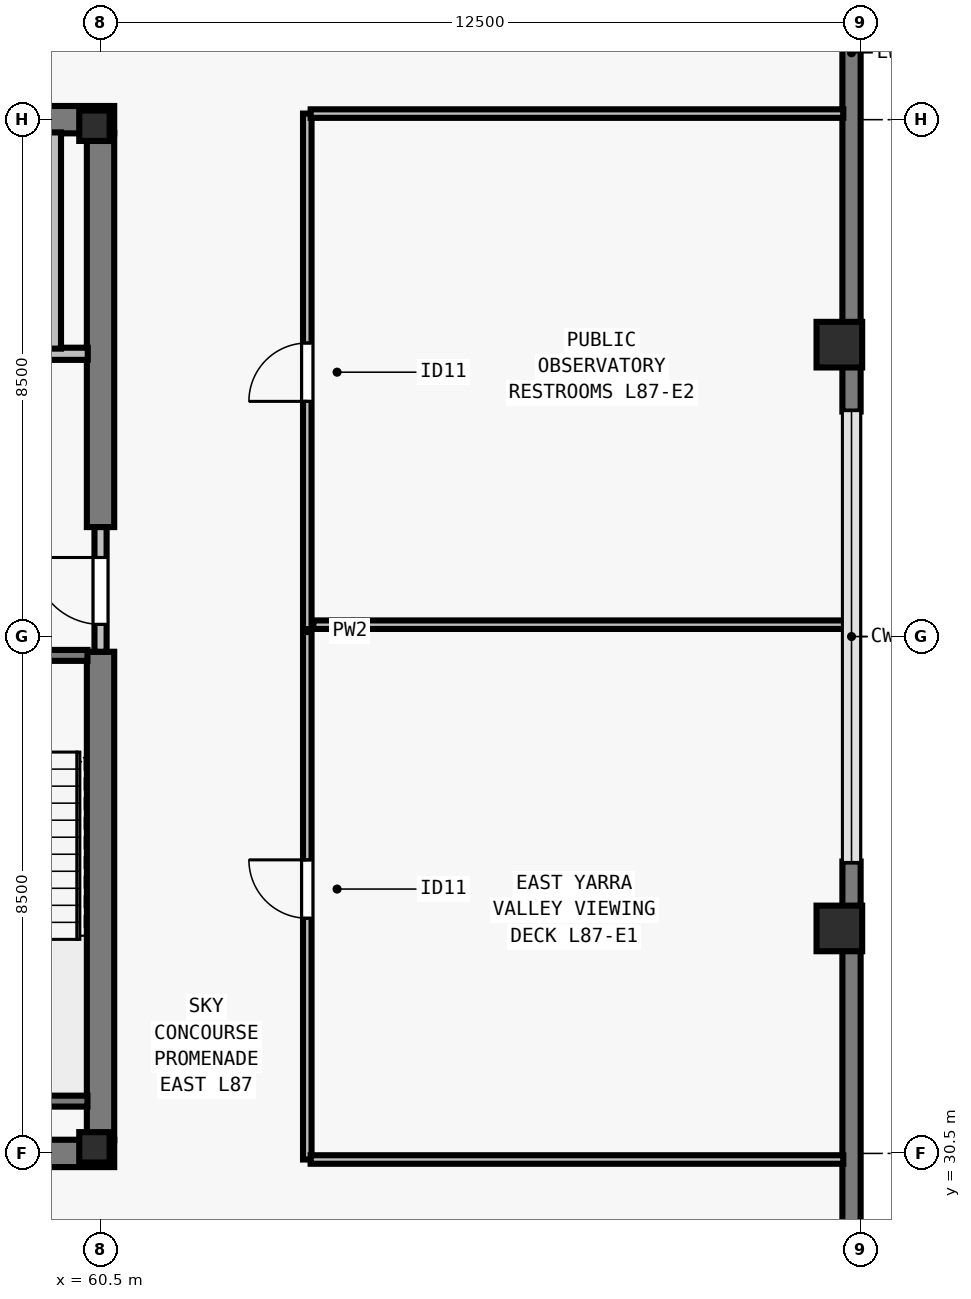
"""IFC4 building model, lengths in metres.
Left out: names, types, materials, properties, quantities, classifications, styles, units other than length and angle.
Written with IfcOpenShell. Run it as: python <this file> out.ifc"""

import sys

from ifc_helpers import new_model, si_unit, direction, frame, frame_2d, origin, origin_2d, place, context, subcontext, project, spatial, rectangle, i_section, extrude, element, fill, save


model = new_model("IFC4")
c1 = context("Model", 3, precision=1e-05, world=origin(), true_north=direction((0.0, 1.0)))
c2 = subcontext(c1, "Body", "Model", "MODEL_VIEW")
j1 = project(units=[si_unit("LENGTHUNIT", "METRE"), si_unit("PLANEANGLEUNIT", "RADIAN")], contexts=[c1])
p1 = place(None, origin())
s1 = spatial("IfcSite", under=j1, at=p1, CompositionType="ELEMENT")
p2 = place(p1, origin())
s2 = spatial("IfcBuilding", under=s1, at=p2, CompositionType="ELEMENT")
p3 = place(p2, frame((0.0, 0.0, 315.5)))
s3 = spatial("IfcBuildingStorey", under=s2, at=p3, CompositionType="ELEMENT", Elevation=315.5)
for number, where, z_axis, x_axis in (
    (1, (60.4, 30.6, 0.0), (0.0, 0.0, 1.0), (1.0, 0.0, 0.0)),
    (2, (60.4, 47.4, 0.0), (0.0, 0.0, 1.0), (1.0, 0.0, 0.0)),
):
    element("IfcColumn", number, at=place(p3, frame(where, z_axis=z_axis, x_axis=x_axis)), inside=s3, PredefinedType="COLUMN", context=c2, shape_type="SweptSolid", body=[
        extrude(i_section(OverallWidth=0.5, OverallDepth=0.5, WebThickness=0.028, FlangeThickness=0.045, at=origin_2d()), origin(), (0.0, 0.0, 1.0), 4.5),
    ])
for number, where, z_axis, x_axis in (
    (3, (72.65, 34.2, 0.0), (0.0, 0.0, 1.0), (0.0, 1.0, 0.0)),
    (4, (72.65, 43.8, 0.0), (0.0, 0.0, 1.0), (0.0, 1.0, 0.0)),
):
    element("IfcColumn", number, at=place(p3, frame(where, z_axis=z_axis, x_axis=x_axis)), inside=s3, PredefinedType="COLUMN", context=c2, shape_type="SweptSolid", body=[
        extrude(rectangle(XDim=0.75, YDim=0.75, at=origin_2d()), origin(), (0.0, 0.0, 1.0), 4.5),
    ])
p4 = place(p3, frame((72.85, 54.5, 0.0), z_axis=(0.0, 0.0, 1.0), x_axis=(0.0, -1.0, 0.0)))
e5 = element("IfcWall", 5, at=p4, inside=s3, PredefinedType="SOLIDWALL", context=c2, shape_type="SweptSolid", body=[
    extrude(rectangle(XDim=11.8, YDim=0.3, at=frame_2d((5.9, 0.0))), origin(), (0.0, 0.0, 1.0), 4.29),
])
p5 = place(p3, frame((72.85, 35.3, 0.0), z_axis=(0.0, 0.0, 1.0), x_axis=(0.0, -1.0, 0.0)))
e6 = element("IfcWall", 6, at=p5, inside=s3, PredefinedType="SOLIDWALL", context=c2, shape_type="SweptSolid", body=[
    extrude(rectangle(XDim=11.522, YDim=0.3, at=frame_2d((5.761, 0.0))), origin(), (0.0, 0.0, 1.0), 4.29),
])
for number, where, z_axis, x_axis in (
    (7, (43.275, 30.5, 0.0), (0.0, 0.0, 1.0), (1.0, 0.0, 0.0)),
    (8, (43.275, 47.5, 0.0), (0.0, 0.0, 1.0), (1.0, 0.0, 0.0)),
):
    element("IfcWall", number, at=place(p3, frame(where, z_axis=z_axis, x_axis=x_axis)), inside=s3, PredefinedType="SHEAR", context=c2, shape_type="SweptSolid", body=[
        extrude(rectangle(XDim=17.45, YDim=0.45, at=frame_2d((8.725, 0.0))), origin(), (0.0, 0.0, 1.0), 4.29),
    ])
p6 = place(p3, frame((60.5, 30.715, 0.0), z_axis=(0.0, 0.0, 1.0), x_axis=(0.0, 1.0, 0.0)))
e9 = element("IfcWall", 9, at=p6, inside=s3, PredefinedType="SHEAR", context=c2, shape_type="SweptSolid", body=[
    extrude(rectangle(XDim=8.035, YDim=0.45, at=frame_2d((4.018, 0.0))), origin(), (0.0, 0.0, 1.0), 4.29),
])
p7 = place(p3, frame((60.5, 40.8, 0.0), z_axis=(0.0, 0.0, 1.0), x_axis=(0.0, 1.0, 0.0)))
e10 = element("IfcWall", 10, at=p7, inside=s3, PredefinedType="SHEAR", context=c2, shape_type="SweptSolid", body=[
    extrude(rectangle(XDim=6.485, YDim=0.45, at=frame_2d((3.242, 0.0))), origin(), (0.0, 0.0, 1.0), 4.29),
])
p8 = place(p3, frame((60.5, 38.75, 0.0), z_axis=(0.0, 0.0, 1.0), x_axis=(0.0, 1.0, 0.0)))
e11 = element("IfcWall", 11, at=p8, inside=s3, PredefinedType="SOLIDWALL", context=c2, shape_type="SweptSolid", body=[
    extrude(rectangle(XDim=2.05, YDim=0.2, at=frame_2d((1.025, 0.0))), origin(), (0.0, 0.0, 1.0), 4.29),
])
p9 = place(p8, frame((0.45, 0.0, 0.0)))
e12 = element("IfcOpeningElement", 12, at=p9, cuts=e11, PredefinedType="OPENING", context=c2, shape_type="SweptSolid", body=[
    extrude(rectangle(XDim=1.1, YDim=2.15, at=frame_2d((0.55, 1.075))), frame((0.0, 0.11, 0.0), z_axis=(0.0, -1.0, 0.0), x_axis=(1.0, 0.0, 0.0)), (0.0, 0.0, 1.0), 0.22),
])
p10 = place(p3, frame((56.735, 43.65, 0.0), z_axis=(0.0, 0.0, 1.0), x_axis=(1.0, 0.0, 0.0)))
e13 = element("IfcWall", 13, at=p10, inside=s3, PredefinedType="SOLIDWALL", context=c2, shape_type="SweptSolid", body=[
    extrude(rectangle(XDim=3.555, YDim=0.2, at=frame_2d((1.777, 0.0))), origin(), (0.0, 0.0, 1.0), 4.29),
])
p11 = place(p10, frame((1.295, 0.0, 0.0)))
e14 = element("IfcOpeningElement", 14, at=p11, cuts=e13, PredefinedType="OPENING", context=c2, shape_type="SweptSolid", body=[
    extrude(rectangle(XDim=1.1, YDim=2.2, at=frame_2d((0.55, 1.1))), frame((0.0, 0.11, 0.0), z_axis=(0.0, -1.0, 0.0), x_axis=(1.0, 0.0, 0.0)), (0.0, 0.0, 1.0), 0.22),
])
p12 = place(p3, frame((59.75, 43.735, 0.0), z_axis=(0.0, 0.0, 1.0), x_axis=(0.0, 1.0, 0.0)))
e15 = element("IfcWall", 15, at=p12, inside=s3, PredefinedType="SOLIDWALL", context=c2, shape_type="SweptSolid", body=[
    extrude(rectangle(XDim=3.555, YDim=0.2, at=frame_2d((1.777, 0.0))), origin(), (0.0, 0.0, 1.0), 4.29),
])
p13 = place(p3, frame((63.9, 30.4, 0.0), z_axis=(0.0, 0.0, 1.0), x_axis=(0.0, 1.0, 0.0)))
e16 = element("IfcWall", 16, at=p13, inside=s3, PredefinedType="PARTITIONING", context=c2, shape_type="SweptSolid", body=[
    extrude(rectangle(XDim=17.2, YDim=0.14, at=frame_2d((8.6, 0.0))), origin(), (0.0, 0.0, 1.0), 4.29),
])
p14 = place(p13, frame((3.968, 0.0, 0.0)))
e17 = element("IfcOpeningElement", 17, at=p14, cuts=e16, PredefinedType="OPENING", context=c2, shape_type="SweptSolid", body=[
    extrude(rectangle(XDim=0.96, YDim=2.12, at=frame_2d((0.48, 1.06))), frame((0.0, 0.08, 0.0), z_axis=(0.0, -1.0, 0.0), x_axis=(1.0, 0.0, 0.0)), (0.0, 0.0, 1.0), 0.16),
])
p15 = place(p13, frame((12.468, 0.0, 0.0)))
e18 = element("IfcOpeningElement", 18, at=p15, cuts=e16, PredefinedType="OPENING", context=c2, shape_type="SweptSolid", body=[
    extrude(rectangle(XDim=0.96, YDim=2.12, at=frame_2d((0.48, 1.06))), frame((0.0, 0.08, 0.0), z_axis=(0.0, -1.0, 0.0), x_axis=(1.0, 0.0, 0.0)), (0.0, 0.0, 1.0), 0.16),
])
for number, where, z_axis, x_axis in (
    (19, (63.955, 30.4, 0.0), (0.0, 0.0, 1.0), (1.0, 0.0, 0.0)),
    (20, (63.955, 47.6, 0.0), (0.0, 0.0, 1.0), (1.0, 0.0, 0.0)),
):
    element("IfcWall", number, at=place(p3, frame(where, z_axis=z_axis, x_axis=x_axis)), inside=s3, PredefinedType="PARTITIONING", context=c2, shape_type="SweptSolid", body=[
        extrude(rectangle(XDim=8.76, YDim=0.14, at=frame_2d((4.38, 0.0))), origin(), (0.0, 0.0, 1.0), 4.29),
    ])
p16 = place(p3, frame((64.0, 39.195, 0.0), z_axis=(0.0, 0.0, 1.0), x_axis=(1.0, 0.0, 0.0)))
e21 = element("IfcWall", 21, at=p16, inside=s3, PredefinedType="PARTITIONING", context=c2, shape_type="SweptSolid", body=[
    extrude(rectangle(XDim=8.83, YDim=0.14, at=frame_2d((4.415, 0.0))), origin(), (0.0, 0.0, 1.0), 4.29),
])
p17 = place(p3, frame((57.005, 38.69, 0.0), z_axis=(0.0, 0.0, 1.0), x_axis=(1.0, 0.0, 0.0)))
e22 = element("IfcWall", 22, at=p17, inside=s3, PredefinedType="SOLIDWALL", context=c2, shape_type="SweptSolid", body=[
    extrude(rectangle(XDim=3.28, YDim=0.18, at=frame_2d((1.64, 0.0))), origin(), (0.0, 0.0, 1.0), 4.29),
])
p18 = place(p17, frame((1.165, 0.0, 0.0)))
e23 = element("IfcOpeningElement", 23, at=p18, cuts=e22, PredefinedType="OPENING", context=c2, shape_type="SweptSolid", body=[
    extrude(rectangle(XDim=0.95, YDim=2.15, at=frame_2d((0.475, 1.075))), frame((0.0, 0.1, 0.0), z_axis=(0.0, -1.0, 0.0), x_axis=(1.0, 0.0, 0.0)), (0.0, 0.0, 1.0), 0.2),
])
p19 = place(p3, frame((57.005, 31.36, 0.0), z_axis=(0.0, 0.0, 1.0), x_axis=(1.0, 0.0, 0.0)))
e24 = element("IfcWall", 24, at=p19, inside=s3, PredefinedType="SOLIDWALL", context=c2, shape_type="SweptSolid", body=[
    extrude(rectangle(XDim=3.28, YDim=0.18, at=frame_2d((1.64, 0.0))), origin(), (0.0, 0.0, 1.0), 4.29),
])
p20 = place(p9, origin())
e25 = element("IfcDoor", 25, at=p20, inside=s3, OperationType="SINGLE_SWING_RIGHT", PredefinedType="DOOR", context=c2, shape_type="SweptSolid", body=[
    extrude(rectangle(XDim=1.1, YDim=2.15, at=frame_2d((0.55, 1.075))), frame((0.0, 0.025, 0.0), z_axis=(0.0, -1.0, 0.0), x_axis=(1.0, 0.0, 0.0)), (0.0, 0.0, 1.0), 0.05),
])
fill(e12, e25)
p21 = place(p14, origin())
e26 = element("IfcDoor", 26, at=p21, inside=s3, OperationType="SINGLE_SWING_RIGHT", PredefinedType="DOOR", context=c2, shape_type="SweptSolid", body=[
    extrude(rectangle(XDim=0.96, YDim=2.12, at=frame_2d((0.48, 1.06))), frame((0.0, 0.025, 0.0), z_axis=(0.0, -1.0, 0.0), x_axis=(1.0, 0.0, 0.0)), (0.0, 0.0, 1.0), 0.05),
])
fill(e17, e26)
p22 = place(p15, origin())
e27 = element("IfcDoor", 27, at=p22, inside=s3, OperationType="SINGLE_SWING_LEFT", PredefinedType="DOOR", context=c2, shape_type="SweptSolid", body=[
    extrude(rectangle(XDim=0.96, YDim=2.12, at=frame_2d((0.48, 1.06))), frame((0.0, 0.025, 0.0), z_axis=(0.0, -1.0, 0.0), x_axis=(1.0, 0.0, 0.0)), (0.0, 0.0, 1.0), 0.05),
])
fill(e18, e27)
save(model, sys.argv[1])
